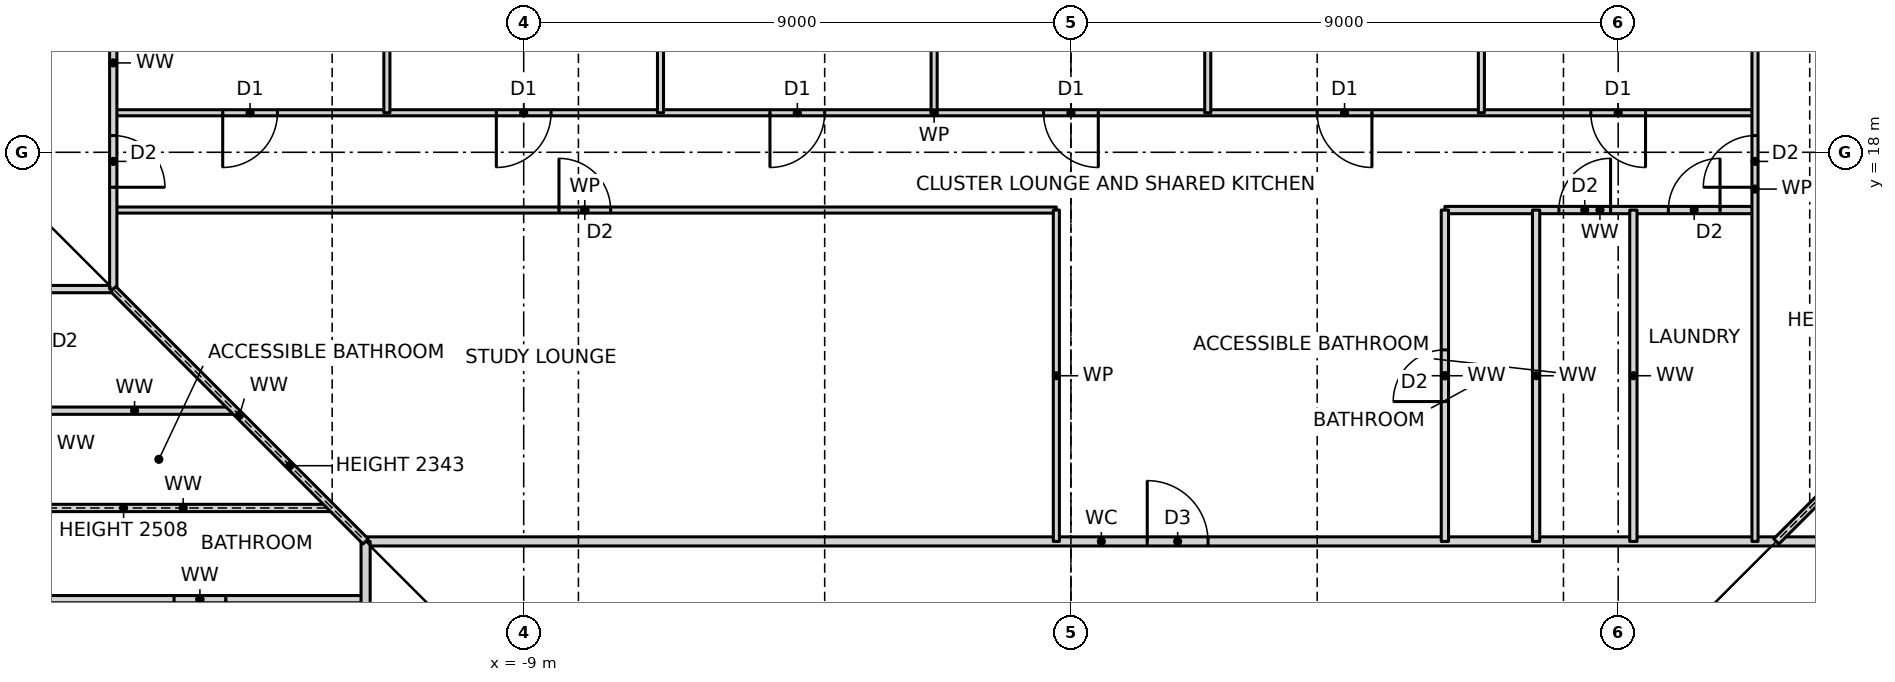
"""IFC4 building model, lengths in metres.
Left out: names, types, materials, properties, quantities, classifications, styles, units other than length and angle.
Written with IfcOpenShell. Run it as: python <this file> out.ifc"""

import sys

from ifc_helpers import new_model, si_unit, direction, frame, frame_2d, origin, place, context, subcontext, project, spatial, rectangle, extrude, element, fill, save


model = new_model("IFC4")
c1 = context("Model", 3, precision=1e-05, world=origin(), true_north=direction((0.0, 1.0)))
c2 = subcontext(c1, "Body", "Model", "MODEL_VIEW")
j1 = project(units=[si_unit("LENGTHUNIT", "METRE"), si_unit("PLANEANGLEUNIT", "RADIAN")], contexts=[c1])
p1 = place(None, origin())
s1 = spatial("IfcSite", under=j1, at=p1, CompositionType="ELEMENT")
p2 = place(p1, origin())
s2 = spatial("IfcBuilding", under=s1, at=p2, CompositionType="ELEMENT")
p3 = place(p2, frame((0.0, 0.0, 29.0)))
s3 = spatial("IfcBuildingStorey", under=s2, at=p3, CompositionType="ELEMENT", Elevation=29.0)
p4 = place(p3, frame((-17.05, 10.65, 0.0), z_axis=(0.0, 0.0, 1.0), x_axis=(1.0, 0.0, 0.0)))
e1 = element("IfcWall", 1, at=p4, inside=s3, PredefinedType="PARTITIONING", context=c2, shape_type="SweptSolid", body=[
    extrude(rectangle(XDim=5.45, YDim=0.12, at=frame_2d((2.725, 0.0))), origin(), (0.0, 0.0, 1.0), 3.27),
])
p5 = place(p4, frame((2.3, 0.0, 0.0)))
e2 = element("IfcOpeningElement", 2, at=p5, cuts=e1, PredefinedType="OPENING", context=c2, shape_type="SweptSolid", body=[
    extrude(rectangle(XDim=0.85, YDim=2.1, at=frame_2d((0.425, 1.05))), frame((0.0, 0.07, 0.0), z_axis=(0.0, -1.0, 0.0), x_axis=(1.0, 0.0, 0.0)), (0.0, 0.0, 1.0), 0.14),
])
p6 = place(p3, frame((-11.6, 11.6, 0.0), z_axis=(0.0, 0.0, 1.0), x_axis=(1.0, 0.0, 0.0)))
e3 = element("IfcWall", 3, at=p6, inside=s3, PredefinedType="PARTITIONING", context=c2, shape_type="SweptSolid", body=[
    extrude(rectangle(XDim=24.2, YDim=0.15, at=frame_2d((12.1, 0.0))), origin(), (0.0, 0.0, 1.0), 3.27),
])
p7 = place(p6, frame((12.855, 0.0, 0.0)))
e4 = element("IfcOpeningElement", 4, at=p7, cuts=e3, PredefinedType="OPENING", context=c2, shape_type="SweptSolid", body=[
    extrude(rectangle(XDim=1.0, YDim=2.1, at=frame_2d((0.5, 1.05))), frame((0.0, 0.085, 0.0), z_axis=(0.0, -1.0, 0.0), x_axis=(1.0, 0.0, 0.0)), (0.0, 0.0, 1.0), 0.17),
])
p8 = place(p3, frame((-17.05, 12.15, 0.0), z_axis=(0.0, 0.0, 1.0), x_axis=(1.0, 0.0, 0.0)))
e5 = element("IfcWall", 5, at=p8, inside=s3, PredefinedType="PARTITIONING", context=c2, shape_type="SweptSolid", body=[
    extrude(rectangle(XDim=4.9, YDim=0.12, at=frame_2d((2.45, 0.0))), origin(), (0.0, 0.0, 1.0), 2.508),
])
p9 = place(p3, frame((-17.05, 13.75, 0.0), z_axis=(0.0, 0.0, 1.0), x_axis=(1.0, 0.0, 0.0)))
e6 = element("IfcWall", 6, at=p9, inside=s3, PredefinedType="PARTITIONING", context=c2, shape_type="SweptSolid", body=[
    extrude(rectangle(XDim=3.3, YDim=0.12, at=frame_2d((1.65, 0.0))), origin(), (0.0, 0.0, 1.0), 3.27),
])
p10 = place(p3, frame((-23.19, 15.75, 0.0), z_axis=(0.0, 0.0, 1.0), x_axis=(1.0, 0.0, 0.0)))
e7 = element("IfcWall", 7, at=p10, inside=s3, PredefinedType="PARTITIONING", context=c2, shape_type="SweptSolid", body=[
    extrude(rectangle(XDim=7.44, YDim=0.12, at=frame_2d((3.72, 0.0))), origin(), (0.0, 0.0, 1.0), 3.27),
])
p11 = place(p3, frame((-15.75, 17.05, 0.0), z_axis=(0.0, 0.0, 1.0), x_axis=(1.0, 0.0, 0.0)))
e8 = element("IfcWall", 8, at=p11, inside=s3, PredefinedType="PARTITIONING", context=c2, shape_type="SweptSolid", body=[
    extrude(rectangle(XDim=15.51, YDim=0.1, at=frame_2d((7.755, 0.0))), origin(), (0.0, 0.0, 1.0), 3.27),
])
p12 = place(p11, frame((7.33, 0.0, 0.0)))
e9 = element("IfcOpeningElement", 9, at=p12, cuts=e8, PredefinedType="OPENING", context=c2, shape_type="SweptSolid", body=[
    extrude(rectangle(XDim=0.85, YDim=2.1, at=frame_2d((0.425, 1.05))), frame((0.0, 0.06, 0.0), z_axis=(0.0, -1.0, 0.0), x_axis=(1.0, 0.0, 0.0)), (0.0, 0.0, 1.0), 0.12),
])
p13 = place(p3, frame((6.15, 17.05, 0.0), z_axis=(0.0, 0.0, 1.0), x_axis=(1.0, 0.0, 0.0)))
e10 = element("IfcWall", 10, at=p13, inside=s3, PredefinedType="PARTITIONING", context=c2, shape_type="SweptSolid", body=[
    extrude(rectangle(XDim=5.1, YDim=0.12, at=frame_2d((2.55, 0.0))), origin(), (0.0, 0.0, 1.0), 3.27),
])
p14 = place(p13, frame((3.675, 0.0, 0.0)))
e11 = element("IfcOpeningElement", 11, at=p14, cuts=e10, PredefinedType="OPENING", context=c2, shape_type="SweptSolid", body=[
    extrude(rectangle(XDim=0.85, YDim=2.1, at=frame_2d((0.425, 1.05))), frame((0.0, 0.07, 0.0), z_axis=(0.0, -1.0, 0.0), x_axis=(1.0, 0.0, 0.0)), (0.0, 0.0, 1.0), 0.14),
])
p15 = place(p13, frame((1.875, 0.0, 0.0)))
e12 = element("IfcOpeningElement", 12, at=p15, cuts=e10, PredefinedType="OPENING", context=c2, shape_type="SweptSolid", body=[
    extrude(rectangle(XDim=0.85, YDim=2.1, at=frame_2d((0.425, 1.05))), frame((0.0, 0.07, 0.0), z_axis=(0.0, -1.0, 0.0), x_axis=(1.0, 0.0, 0.0)), (0.0, 0.0, 1.0), 0.14),
])
p16 = place(p3, frame((-15.75, 18.65, 0.0), z_axis=(0.0, 0.0, 1.0), x_axis=(1.0, 0.0, 0.0)))
e13 = element("IfcWall", 13, at=p16, inside=s3, PredefinedType="PARTITIONING", context=c2, shape_type="SweptSolid", body=[
    extrude(rectangle(XDim=27.0, YDim=0.1, at=frame_2d((13.5, 0.0))), origin(), (0.0, 0.0, 1.0), 3.27),
])
p17 = place(p16, frame((24.3, 0.0, 0.0)))
e14 = element("IfcOpeningElement", 14, at=p17, cuts=e13, PredefinedType="OPENING", context=c2, shape_type="SweptSolid", body=[
    extrude(rectangle(XDim=0.9, YDim=2.1, at=frame_2d((0.45, 1.05))), frame((0.0, 0.06, 0.0), z_axis=(0.0, -1.0, 0.0), x_axis=(1.0, 0.0, 0.0)), (0.0, 0.0, 1.0), 0.12),
])
p18 = place(p16, frame((19.8, 0.0, 0.0)))
e15 = element("IfcOpeningElement", 15, at=p18, cuts=e13, PredefinedType="OPENING", context=c2, shape_type="SweptSolid", body=[
    extrude(rectangle(XDim=0.9, YDim=2.1, at=frame_2d((0.45, 1.05))), frame((0.0, 0.06, 0.0), z_axis=(0.0, -1.0, 0.0), x_axis=(1.0, 0.0, 0.0)), (0.0, 0.0, 1.0), 0.12),
])
p19 = place(p16, frame((15.3, 0.0, 0.0)))
e16 = element("IfcOpeningElement", 16, at=p19, cuts=e13, PredefinedType="OPENING", context=c2, shape_type="SweptSolid", body=[
    extrude(rectangle(XDim=0.9, YDim=2.1, at=frame_2d((0.45, 1.05))), frame((0.0, 0.06, 0.0), z_axis=(0.0, -1.0, 0.0), x_axis=(1.0, 0.0, 0.0)), (0.0, 0.0, 1.0), 0.12),
])
p20 = place(p16, frame((10.8, 0.0, 0.0)))
e17 = element("IfcOpeningElement", 17, at=p20, cuts=e13, PredefinedType="OPENING", context=c2, shape_type="SweptSolid", body=[
    extrude(rectangle(XDim=0.9, YDim=2.1, at=frame_2d((0.45, 1.05))), frame((0.0, 0.06, 0.0), z_axis=(0.0, -1.0, 0.0), x_axis=(1.0, 0.0, 0.0)), (0.0, 0.0, 1.0), 0.12),
])
p21 = place(p16, frame((6.3, 0.0, 0.0)))
e18 = element("IfcOpeningElement", 18, at=p21, cuts=e13, PredefinedType="OPENING", context=c2, shape_type="SweptSolid", body=[
    extrude(rectangle(XDim=0.9, YDim=2.1, at=frame_2d((0.45, 1.05))), frame((0.0, 0.06, 0.0), z_axis=(0.0, -1.0, 0.0), x_axis=(1.0, 0.0, 0.0)), (0.0, 0.0, 1.0), 0.12),
])
p22 = place(p16, frame((1.8, 0.0, 0.0)))
e19 = element("IfcOpeningElement", 19, at=p22, cuts=e13, PredefinedType="OPENING", context=c2, shape_type="SweptSolid", body=[
    extrude(rectangle(XDim=0.9, YDim=2.1, at=frame_2d((0.45, 1.05))), frame((0.0, 0.06, 0.0), z_axis=(0.0, -1.0, 0.0), x_axis=(1.0, 0.0, 0.0)), (0.0, 0.0, 1.0), 0.12),
])
p23 = place(p3, frame((11.6, 11.6, 0.0), z_axis=(0.0, 0.0, 1.0), x_axis=(0.707106781187, 0.707106781187, 0.0)))
e20 = element("IfcWall", 20, at=p23, inside=s3, PredefinedType="PARTITIONING", context=c2, shape_type="SweptSolid", body=[
    extrude(rectangle(XDim=5.869, YDim=0.12, at=frame_2d((2.935, 0.0))), origin(), (0.0, 0.0, 1.0), 2.343),
])
p24 = place(p3, frame((11.25, 11.6, 0.0), z_axis=(0.0, 0.0, 1.0), x_axis=(0.0, 1.0, 0.0)))
e21 = element("IfcWall", 21, at=p24, inside=s3, PredefinedType="PARTITIONING", context=c2, shape_type="SweptSolid", body=[
    extrude(rectangle(XDim=11.59, YDim=0.1, at=frame_2d((5.795, 0.0))), origin(), (0.0, 0.0, 1.0), 3.27),
])
p25 = place(p24, frame((5.825, 0.0, 0.0)))
e22 = element("IfcOpeningElement", 22, at=p25, cuts=e21, PredefinedType="OPENING", context=c2, shape_type="SweptSolid", body=[
    extrude(rectangle(XDim=0.85, YDim=2.1, at=frame_2d((0.425, 1.05))), frame((0.0, 0.06, 0.0), z_axis=(0.0, -1.0, 0.0), x_axis=(1.0, 0.0, 0.0)), (0.0, 0.0, 1.0), 0.12),
])
for number, where, z_axis, x_axis in (
    (23, (9.25, 11.6, 0.0), (0.0, 0.0, 1.0), (0.0, 1.0, 0.0)),
    (24, (7.65, 11.6, 0.0), (0.0, 0.0, 1.0), (0.0, 1.0, 0.0)),
):
    element("IfcWall", number, at=place(p3, frame(where, z_axis=z_axis, x_axis=x_axis)), inside=s3, PredefinedType="PARTITIONING", context=c2, shape_type="SweptSolid", body=[
        extrude(rectangle(XDim=5.45, YDim=0.12, at=frame_2d((2.725, 0.0))), origin(), (0.0, 0.0, 1.0), 3.27),
    ])
p26 = place(p3, frame((6.75, 18.65, 0.0), z_axis=(0.0, 0.0, 1.0), x_axis=(0.0, 1.0, 0.0)))
e25 = element("IfcWall", 25, at=p26, inside=s3, PredefinedType="PARTITIONING", context=c2, shape_type="SweptSolid", body=[
    extrude(rectangle(XDim=4.54, YDim=0.1, at=frame_2d((2.27, 0.0))), origin(), (0.0, 0.0, 1.0), 3.27),
])
p27 = place(p3, frame((6.15, 11.6, 0.0), z_axis=(0.0, 0.0, 1.0), x_axis=(0.0, 1.0, 0.0)))
e26 = element("IfcWall", 26, at=p27, inside=s3, PredefinedType="PARTITIONING", context=c2, shape_type="SweptSolid", body=[
    extrude(rectangle(XDim=5.45, YDim=0.12, at=frame_2d((2.725, 0.0))), origin(), (0.0, 0.0, 1.0), 3.27),
])
p28 = place(p27, frame((2.3, 0.0, 0.0)))
e27 = element("IfcOpeningElement", 27, at=p28, cuts=e26, PredefinedType="OPENING", context=c2, shape_type="SweptSolid", body=[
    extrude(rectangle(XDim=0.85, YDim=2.1, at=frame_2d((0.425, 1.05))), frame((0.0, 0.07, 0.0), z_axis=(0.0, -1.0, 0.0), x_axis=(1.0, 0.0, 0.0)), (0.0, 0.0, 1.0), 0.14),
])
p29 = place(p3, frame((2.25, 18.65, 0.0), z_axis=(0.0, 0.0, 1.0), x_axis=(0.0, 1.0, 0.0)))
e28 = element("IfcWall", 28, at=p29, inside=s3, PredefinedType="PARTITIONING", context=c2, shape_type="SweptSolid", body=[
    extrude(rectangle(XDim=4.54, YDim=0.1, at=frame_2d((2.27, 0.0))), origin(), (0.0, 0.0, 1.0), 3.27),
])
p30 = place(p3, frame((-0.24, 11.6, 0.0), z_axis=(0.0, 0.0, 1.0), x_axis=(0.0, 1.0, 0.0)))
e29 = element("IfcWall", 29, at=p30, inside=s3, PredefinedType="PARTITIONING", context=c2, shape_type="SweptSolid", body=[
    extrude(rectangle(XDim=5.45, YDim=0.1, at=frame_2d((2.725, 0.0))), origin(), (0.0, 0.0, 1.0), 3.27),
])
for number, where, z_axis, x_axis in (
    (30, (-2.25, 18.65, 0.0), (0.0, 0.0, 1.0), (0.0, 1.0, 0.0)),
    (31, (-6.75, 18.65, 0.0), (0.0, 0.0, 1.0), (0.0, 1.0, 0.0)),
    (32, (-11.25, 18.65, 0.0), (0.0, 0.0, 1.0), (0.0, 1.0, 0.0)),
):
    element("IfcWall", number, at=place(p3, frame(where, z_axis=z_axis, x_axis=x_axis)), inside=s3, PredefinedType="PARTITIONING", context=c2, shape_type="SweptSolid", body=[
        extrude(rectangle(XDim=4.54, YDim=0.1, at=frame_2d((2.27, 0.0))), origin(), (0.0, 0.0, 1.0), 3.27),
    ])
p31 = place(p3, frame((-11.6, -11.6, 0.0), z_axis=(0.0, 0.0, 1.0), x_axis=(0.0, 1.0, 0.0)))
e33 = element("IfcWall", 33, at=p31, inside=s3, PredefinedType="PARTITIONING", context=c2, shape_type="SweptSolid", body=[
    extrude(rectangle(XDim=23.2, YDim=0.15, at=frame_2d((11.6, 0.0))), origin(), (0.0, 0.0, 1.0), 3.27),
])
p32 = place(p31, frame((20.55, 0.0, 0.0)))
e34 = element("IfcOpeningElement", 34, at=p32, cuts=e33, PredefinedType="OPENING", context=c2, shape_type="SweptSolid", body=[
    extrude(rectangle(XDim=1.0, YDim=2.1, at=frame_2d((0.5, 1.05))), frame((0.0, 0.085, 0.0), z_axis=(0.0, -1.0, 0.0), x_axis=(1.0, 0.0, 0.0)), (0.0, 0.0, 1.0), 0.17),
])
p33 = place(p31, frame((18.5, 0.0, 0.0)))
e35 = element("IfcOpeningElement", 35, at=p33, cuts=e33, PredefinedType="OPENING", context=c2, shape_type="SweptSolid", body=[
    extrude(rectangle(XDim=0.9, YDim=2.1, at=frame_2d((0.45, 1.05))), frame((0.0, 0.085, 0.0), z_axis=(0.0, -1.0, 0.0), x_axis=(1.0, 0.0, 0.0)), (0.0, 0.0, 1.0), 0.17),
])
p34 = place(p3, frame((-15.75, 15.75, 0.0), z_axis=(0.0, 0.0, 1.0), x_axis=(0.0, 1.0, 0.0)))
e36 = element("IfcWall", 36, at=p34, inside=s3, PredefinedType="PARTITIONING", context=c2, shape_type="SweptSolid", body=[
    extrude(rectangle(XDim=7.44, YDim=0.12, at=frame_2d((3.72, 0.0))), origin(), (0.0, 0.0, 1.0), 3.27),
])
p35 = place(p34, frame((1.675, 0.0, 0.0)))
e37 = element("IfcOpeningElement", 37, at=p35, cuts=e36, PredefinedType="OPENING", context=c2, shape_type="SweptSolid", body=[
    extrude(rectangle(XDim=0.85, YDim=2.1, at=frame_2d((0.425, 1.05))), frame((0.0, 0.07, 0.0), z_axis=(0.0, -1.0, 0.0), x_axis=(1.0, 0.0, 0.0)), (0.0, 0.0, 1.0), 0.14),
])
p36 = place(p3, frame((-11.6, 11.6, 0.0), z_axis=(0.0, 0.0, 1.0), x_axis=(-0.707106781187, 0.707106781187, 0.0)))
e38 = element("IfcWall", 38, at=p36, inside=s3, PredefinedType="PARTITIONING", context=c2, shape_type="SweptSolid", body=[
    extrude(rectangle(XDim=5.869, YDim=0.12, at=frame_2d((2.935, 0.0))), origin(), (0.0, 0.0, 1.0), 2.343),
])
p37 = place(p25, origin())
e39 = element("IfcDoor", 39, at=p37, inside=s3, OperationType="SINGLE_SWING_LEFT", PredefinedType="DOOR", context=c2, shape_type="SweptSolid", body=[
    extrude(rectangle(XDim=0.85, YDim=2.1, at=frame_2d((0.425, 1.05))), frame((0.0, 0.025, 0.0), z_axis=(0.0, -1.0, 0.0), x_axis=(1.0, 0.0, 0.0)), (0.0, 0.0, 1.0), 0.05),
])
fill(e22, e39)
p38 = place(p17, frame((0.9, 0.0, 0.0), z_axis=(0.0, 0.0, 1.0), x_axis=(-1.0, 0.0, 0.0)))
e40 = element("IfcDoor", 40, at=p38, inside=s3, OperationType="SINGLE_SWING_LEFT", PredefinedType="DOOR", context=c2, shape_type="SweptSolid", body=[
    extrude(rectangle(XDim=0.9, YDim=2.1, at=frame_2d((0.45, 1.05))), frame((0.0, 0.025, 0.0), z_axis=(0.0, -1.0, 0.0), x_axis=(1.0, 0.0, 0.0)), (0.0, 0.0, 1.0), 0.05),
])
fill(e14, e40)
p39 = place(p18, frame((0.9, 0.0, 0.0), z_axis=(0.0, 0.0, 1.0), x_axis=(-1.0, 0.0, 0.0)))
e41 = element("IfcDoor", 41, at=p39, inside=s3, OperationType="SINGLE_SWING_LEFT", PredefinedType="DOOR", context=c2, shape_type="SweptSolid", body=[
    extrude(rectangle(XDim=0.9, YDim=2.1, at=frame_2d((0.45, 1.05))), frame((0.0, 0.025, 0.0), z_axis=(0.0, -1.0, 0.0), x_axis=(1.0, 0.0, 0.0)), (0.0, 0.0, 1.0), 0.05),
])
fill(e15, e41)
p40 = place(p19, frame((0.9, 0.0, 0.0), z_axis=(0.0, 0.0, 1.0), x_axis=(-1.0, 0.0, 0.0)))
e42 = element("IfcDoor", 42, at=p40, inside=s3, OperationType="SINGLE_SWING_LEFT", PredefinedType="DOOR", context=c2, shape_type="SweptSolid", body=[
    extrude(rectangle(XDim=0.9, YDim=2.1, at=frame_2d((0.45, 1.05))), frame((0.0, 0.025, 0.0), z_axis=(0.0, -1.0, 0.0), x_axis=(1.0, 0.0, 0.0)), (0.0, 0.0, 1.0), 0.05),
])
fill(e16, e42)
p41 = place(p20, frame((0.9, 0.0, 0.0), z_axis=(0.0, 0.0, 1.0), x_axis=(-1.0, 0.0, 0.0)))
e43 = element("IfcDoor", 43, at=p41, inside=s3, OperationType="SINGLE_SWING_RIGHT", PredefinedType="DOOR", context=c2, shape_type="SweptSolid", body=[
    extrude(rectangle(XDim=0.9, YDim=2.1, at=frame_2d((0.45, 1.05))), frame((0.0, 0.025, 0.0), z_axis=(0.0, -1.0, 0.0), x_axis=(1.0, 0.0, 0.0)), (0.0, 0.0, 1.0), 0.05),
])
fill(e17, e43)
p42 = place(p21, frame((0.9, 0.0, 0.0), z_axis=(0.0, 0.0, 1.0), x_axis=(-1.0, 0.0, 0.0)))
e44 = element("IfcDoor", 44, at=p42, inside=s3, OperationType="SINGLE_SWING_RIGHT", PredefinedType="DOOR", context=c2, shape_type="SweptSolid", body=[
    extrude(rectangle(XDim=0.9, YDim=2.1, at=frame_2d((0.45, 1.05))), frame((0.0, 0.025, 0.0), z_axis=(0.0, -1.0, 0.0), x_axis=(1.0, 0.0, 0.0)), (0.0, 0.0, 1.0), 0.05),
])
fill(e18, e44)
p43 = place(p22, frame((0.9, 0.0, 0.0), z_axis=(0.0, 0.0, 1.0), x_axis=(-1.0, 0.0, 0.0)))
e45 = element("IfcDoor", 45, at=p43, inside=s3, OperationType="SINGLE_SWING_RIGHT", PredefinedType="DOOR", context=c2, shape_type="SweptSolid", body=[
    extrude(rectangle(XDim=0.9, YDim=2.1, at=frame_2d((0.45, 1.05))), frame((0.0, 0.025, 0.0), z_axis=(0.0, -1.0, 0.0), x_axis=(1.0, 0.0, 0.0)), (0.0, 0.0, 1.0), 0.05),
])
fill(e19, e45)
p44 = place(p7, origin())
e46 = element("IfcDoor", 46, at=p44, inside=s3, OperationType="SINGLE_SWING_LEFT", PredefinedType="DOOR", context=c2, shape_type="SweptSolid", body=[
    extrude(rectangle(XDim=1.0, YDim=2.1, at=frame_2d((0.5, 1.05))), frame((0.0, 0.025, 0.0), z_axis=(0.0, -1.0, 0.0), x_axis=(1.0, 0.0, 0.0)), (0.0, 0.0, 1.0), 0.05),
])
fill(e4, e46)
p45 = place(p14, origin())
e47 = element("IfcDoor", 47, at=p45, inside=s3, OperationType="SINGLE_SWING_RIGHT", PredefinedType="DOOR", context=c2, shape_type="SweptSolid", body=[
    extrude(rectangle(XDim=0.85, YDim=2.1, at=frame_2d((0.425, 1.05))), frame((0.0, 0.025, 0.0), z_axis=(0.0, -1.0, 0.0), x_axis=(1.0, 0.0, 0.0)), (0.0, 0.0, 1.0), 0.05),
])
fill(e11, e47)
p46 = place(p15, origin())
e48 = element("IfcDoor", 48, at=p46, inside=s3, OperationType="SINGLE_SWING_RIGHT", PredefinedType="DOOR", context=c2, shape_type="SweptSolid", body=[
    extrude(rectangle(XDim=0.85, YDim=2.1, at=frame_2d((0.425, 1.05))), frame((0.0, 0.025, 0.0), z_axis=(0.0, -1.0, 0.0), x_axis=(1.0, 0.0, 0.0)), (0.0, 0.0, 1.0), 0.05),
])
fill(e12, e48)
p47 = place(p28, origin())
e49 = element("IfcDoor", 49, at=p47, inside=s3, OperationType="SINGLE_SWING_LEFT", PredefinedType="DOOR", context=c2, shape_type="SweptSolid", body=[
    extrude(rectangle(XDim=0.85, YDim=2.1, at=frame_2d((0.425, 1.05))), frame((0.0, 0.025, 0.0), z_axis=(0.0, -1.0, 0.0), x_axis=(1.0, 0.0, 0.0)), (0.0, 0.0, 1.0), 0.05),
])
fill(e27, e49)
p48 = place(p12, origin())
e50 = element("IfcDoor", 50, at=p48, inside=s3, OperationType="SINGLE_SWING_LEFT", PredefinedType="DOOR", context=c2, shape_type="SweptSolid", body=[
    extrude(rectangle(XDim=0.85, YDim=2.1, at=frame_2d((0.425, 1.05))), frame((0.0, 0.025, 0.0), z_axis=(0.0, -1.0, 0.0), x_axis=(1.0, 0.0, 0.0)), (0.0, 0.0, 1.0), 0.05),
])
fill(e9, e50)
p49 = place(p5, frame((0.85, 0.0, 0.0), z_axis=(0.0, 0.0, 1.0), x_axis=(-1.0, 0.0, 0.0)))
e51 = element("IfcDoor", 51, at=p49, inside=s3, OperationType="SINGLE_SWING_LEFT", PredefinedType="DOOR", context=c2, shape_type="SweptSolid", body=[
    extrude(rectangle(XDim=0.85, YDim=2.1, at=frame_2d((0.425, 1.05))), frame((0.0, 0.025, 0.0), z_axis=(0.0, -1.0, 0.0), x_axis=(1.0, 0.0, 0.0)), (0.0, 0.0, 1.0), 0.05),
])
fill(e2, e51)
p50 = place(p35, frame((0.85, 0.0, 0.0), z_axis=(0.0, 0.0, 1.0), x_axis=(-1.0, 0.0, 0.0)))
e52 = element("IfcDoor", 52, at=p50, inside=s3, OperationType="SINGLE_SWING_RIGHT", PredefinedType="DOOR", context=c2, shape_type="SweptSolid", body=[
    extrude(rectangle(XDim=0.85, YDim=2.1, at=frame_2d((0.425, 1.05))), frame((0.0, 0.025, 0.0), z_axis=(0.0, -1.0, 0.0), x_axis=(1.0, 0.0, 0.0)), (0.0, 0.0, 1.0), 0.05),
])
fill(e37, e52)
save(model, sys.argv[1])
